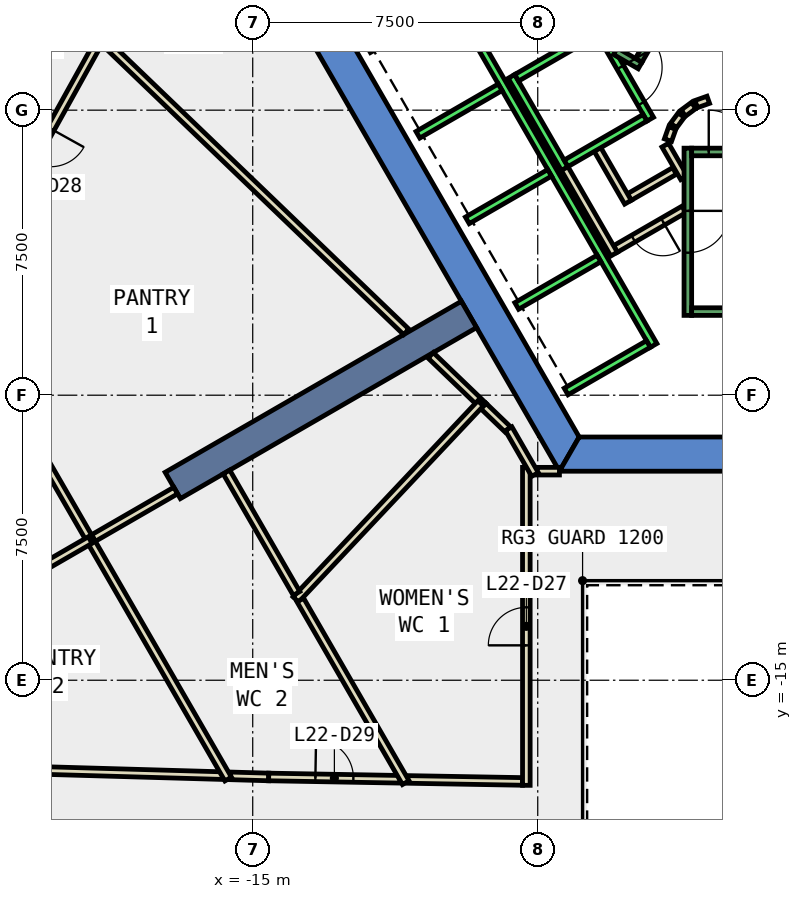
"""IFC4 building model, lengths in metres.
Left out: names, types, materials, properties, quantities, classifications, styles, units other than length and angle.
Written with IfcOpenShell. Run it as: python <this file> out.ifc"""

import sys

from ifc_helpers import new_model, si_unit, direction, frame, frame_2d, origin, place, context, subcontext, project, spatial, polyline, rectangle, outline, extrude, element, fill, save


model = new_model("IFC4")
c1 = context("Model", 3, precision=1e-05, world=origin(), true_north=direction((0.0, 1.0)))
c2 = subcontext(c1, "Body", "Model", "MODEL_VIEW")
j1 = project(units=[si_unit("LENGTHUNIT", "METRE"), si_unit("PLANEANGLEUNIT", "RADIAN")], contexts=[c1])
p1 = place(None, origin())
s1 = spatial("IfcSite", under=j1, at=p1, CompositionType="ELEMENT")
p2 = place(p1, origin())
s2 = spatial("IfcBuilding", under=s1, at=p2, CompositionType="ELEMENT")
p3 = place(p2, frame((0.0, 0.0, 103.4)))
s3 = spatial("IfcBuildingStorey", under=s2, at=p3, CompositionType="ELEMENT", Elevation=103.4)
p4 = place(p3, frame((0.0, 0.0, -0.4)))
e1 = element("IfcWall", 1, at=p4, inside=s3, PredefinedType="SHEAR", context=c2, shape_type="SweptSolid", body=[
    extrude(outline(polyline([(-13.856, 2.5), (-6.928, -9.5), (-6.409, -8.6), (-12.817, 2.5), (-13.856, 2.5)])), origin(), (0.0, 0.0, 1.0), 4.2),
])
p5 = place(p3, frame((0.0, 0.0, -0.4)))
e2 = element("IfcWall", 2, at=p5, inside=s3, PredefinedType="SHEAR", context=c2, shape_type="SweptSolid", body=[
    extrude(outline(polyline([(3.75, -9.5), (3.75, -8.6), (-6.409, -8.6), (-6.928, -9.5), (3.75, -9.5)])), origin(), (0.0, 0.0, 1.0), 4.2),
])
p6 = place(p3, frame((-9.31, -5.375, -0.4), z_axis=(0.0, 0.0, 1.0), x_axis=(-0.866017533419, -0.500013631625, 0.0)))
e3 = element("IfcWall", 3, at=p6, inside=s3, PredefinedType="SHEAR", context=c2, shape_type="SweptSolid", body=[
    extrude(rectangle(XDim=9.0, YDim=0.8, at=frame_2d((4.5, 0.0))), origin(), (0.0, 0.0, 1.0), 4.2),
])
p7 = place(p3, frame((-10.923, -17.61, 0.0), z_axis=(0.0, 0.0, 1.0), x_axis=(0.999846489632, -0.017521334753, 0.0)))
e4 = element("IfcWall", 4, at=p7, inside=s3, PredefinedType="PARTITIONING", context=c2, shape_type="SweptSolid", body=[
    extrude(rectangle(XDim=3.024, YDim=0.2, at=frame_2d((1.512, 0.0))), origin(), (0.0, 0.0, 1.0), 3.8),
])
p8 = place(p3, frame((-19.047, 1.799, 0.0), z_axis=(0.0, 0.0, 1.0), x_axis=(-0.485240396382, -0.87438078531, 0.0)))
e5 = element("IfcWall", 5, at=p8, inside=s3, PredefinedType="PARTITIONING", context=c2, shape_type="SweptSolid", body=[
    extrude(rectangle(XDim=6.232, YDim=0.2, at=frame_2d((3.116, 0.0))), origin(), (0.0, 0.0, 1.0), 3.8),
])
p9 = place(p8, frame((2.616, 0.0, 0.0)))
e6 = element("IfcOpeningElement", 6, at=p9, cuts=e5, PredefinedType="OPENING", context=c2, shape_type="SweptSolid", body=[
    extrude(rectangle(XDim=1.0, YDim=2.1, at=frame_2d((0.5, 1.05))), frame((0.0, 0.11, 0.0), z_axis=(0.0, -1.0, 0.0), x_axis=(1.0, 0.0, 0.0)), (0.0, 0.0, 1.0), 0.22),
])
p10 = place(p3, frame((-15.596, -17.516, 0.0), z_axis=(0.0, 0.0, 1.0), x_axis=(0.99959813819, -0.028347171427, 0.0)))
e7 = element("IfcWall", 7, at=p10, inside=s3, PredefinedType="PARTITIONING", context=c2, shape_type="SweptSolid", body=[
    extrude(rectangle(XDim=1.016, YDim=0.2, at=frame_2d((0.508, 0.0))), origin(), (0.0, 0.0, 1.0), 3.8),
])
p11 = place(p3, frame((-14.58, -17.545, 0.0), z_axis=(0.0, 0.0, 1.0), x_axis=(0.999844180431, -0.01765261618, 0.0)))
e8 = element("IfcWall", 8, at=p11, inside=s3, PredefinedType="PARTITIONING", context=c2, shape_type="SweptSolid", body=[
    extrude(rectangle(XDim=3.458, YDim=0.2, at=frame_2d((1.729, 0.0))), origin(), (0.0, 0.0, 1.0), 3.8),
])
p12 = place(p11, frame((1.229, 0.0, 0.0)))
e9 = element("IfcOpeningElement", 9, at=p12, cuts=e8, PredefinedType="OPENING", context=c2, shape_type="SweptSolid", body=[
    extrude(rectangle(XDim=1.0, YDim=2.1, at=frame_2d((0.5, 1.05))), frame((0.0, 0.11, 0.0), z_axis=(0.0, -1.0, 0.0), x_axis=(1.0, 0.0, 0.0)), (0.0, 0.0, 1.0), 0.22),
])
p13 = place(p3, frame((-21.471, -17.347, 0.0), z_axis=(0.0, 0.0, 1.0), x_axis=(0.999587337564, -0.028725504044, 0.0)))
e10 = element("IfcWall", 10, at=p13, inside=s3, PredefinedType="PARTITIONING", context=c2, shape_type="SweptSolid", body=[
    extrude(rectangle(XDim=5.677, YDim=0.2, at=frame_2d((2.839, 0.0))), origin(), (0.0, 0.0, 1.0), 3.8),
])
p14 = place(p3, frame((-3.9, -1.599, 0.0), z_axis=(0.0, 0.0, 1.0), x_axis=(-0.865969445389, -0.500096910261, 0.0)))
e11 = element("IfcWall", 11, at=p14, inside=s3, PredefinedType="PARTITIONING", context=c2, shape_type="SweptSolid", body=[
    extrude(rectangle(XDim=1.373, YDim=0.2, at=frame_2d((0.687, 0.0))), origin(), (0.0, 0.0, 1.0), 3.8),
])
p15 = place(p3, frame((-5.126, -2.422, 0.0), z_axis=(0.0, 0.0, 1.0), x_axis=(-0.500062241894, 0.865989465428, 0.0)))
e12 = element("IfcWall", 12, at=p15, inside=s3, PredefinedType="PARTITIONING", context=c2, shape_type="SweptSolid", body=[
    extrude(rectangle(XDim=1.7, YDim=0.2, at=frame_2d((0.85, 0.0))), origin(), (0.0, 0.0, 1.0), 3.8),
])
p16 = place(p3, frame((-3.65, -2.61, 0.0), z_axis=(0.0, 0.0, 1.0), x_axis=(-0.866072462134, -0.499918483688, 0.0)))
e13 = element("IfcWall", 13, at=p16, inside=s3, PredefinedType="PARTITIONING", context=c2, shape_type="SweptSolid", body=[
    extrude(rectangle(XDim=2.084, YDim=0.2, at=frame_2d((1.042, 0.0))), origin(), (0.0, 0.0, 1.0), 3.8),
])
p17 = place(p16, frame((0.642, 0.0, 0.0)))
e14 = element("IfcOpeningElement", 14, at=p17, cuts=e13, PredefinedType="OPENING", context=c2, shape_type="SweptSolid", body=[
    extrude(rectangle(XDim=0.9, YDim=2.1, at=frame_2d((0.45, 1.05))), frame((0.0, 0.11, 0.0), z_axis=(0.0, -1.0, 0.0), x_axis=(1.0, 0.0, 0.0)), (0.0, 0.0, 1.0), 0.22),
])
p18 = place(p3, frame((-5.492, -3.788, 0.0), z_axis=(0.0, 0.0, 1.0), x_axis=(-0.500008949224, 0.866020236886, 0.0)))
e15 = element("IfcWall", 15, at=p18, inside=s3, PredefinedType="PARTITIONING", context=c2, shape_type="SweptSolid", body=[
    extrude(rectangle(XDim=2.68, YDim=0.2, at=frame_2d((1.34, 0.0))), origin(), (0.0, 0.0, 1.0), 3.8),
])
p19 = place(p3, frame((-4.145, -0.92, 0.0), z_axis=(0.0, 0.0, 1.0), x_axis=(0.499743786207, -0.866173278362, 0.0)))
e16 = element("IfcWall", 16, at=p19, inside=s3, PredefinedType="PARTITIONING", context=c2, shape_type="SweptSolid", body=[
    extrude(rectangle(XDim=0.991, YDim=0.2, at=frame_2d((0.495, 0.0))), origin(), (0.0, 0.0, 1.0), 3.8),
])
p20 = place(p3, frame((-2.771, 4.7, 0.0), z_axis=(0.0, 0.0, 1.0), x_axis=(0.499969479948, -0.866043023828, 0.0)))
e17 = element("IfcWall", 17, at=p20, inside=s3, PredefinedType="PARTITIONING", context=c2, shape_type="SweptSolid", body=[
    extrude(rectangle(XDim=4.99, YDim=0.2, at=frame_2d((2.495, 0.0))), origin(), (0.0, 0.0, 1.0), 3.8),
])
p21 = place(p20, frame((1.945, 0.0, 0.0)))
e18 = element("IfcOpeningElement", 18, at=p21, cuts=e17, PredefinedType="OPENING", context=c2, shape_type="SweptSolid", body=[
    extrude(rectangle(XDim=1.0, YDim=2.1, at=frame_2d((0.5, 1.05))), frame((0.0, 0.11, 0.0), z_axis=(0.0, -1.0, 0.0), x_axis=(1.0, 0.0, 0.0)), (0.0, 0.0, 1.0), 0.22),
])
p22 = place(p3, frame((-3.012, 0.273, 0.0), z_axis=(0.0, 0.0, 1.0), x_axis=(-0.942280615813, -0.334824194261, 0.0)))
e19 = element("IfcWall", 19, at=p22, inside=s3, PredefinedType="PARTITIONING", context=c2, shape_type="SweptSolid", body=[
    extrude(rectangle(XDim=0.338, YDim=0.2, at=frame_2d((0.169, 0.0))), origin(), (0.0, 0.0, 1.0), 3.8),
])
p23 = place(p3, frame((-3.397, 0.124, 0.0), z_axis=(0.0, 0.0, 1.0), x_axis=(-0.804311165252, -0.594208338422, 0.0)))
e20 = element("IfcWall", 20, at=p23, inside=s3, PredefinedType="PARTITIONING", context=c2, shape_type="SweptSolid", body=[
    extrude(rectangle(XDim=0.338, YDim=0.2, at=frame_2d((0.169, 0.0))), origin(), (0.0, 0.0, 1.0), 3.8),
])
p24 = place(p3, frame((-3.723, -0.131, 0.0), z_axis=(0.0, 0.0, 1.0), x_axis=(-0.594675113454, -0.803966112121, 0.0)))
e21 = element("IfcWall", 21, at=p24, inside=s3, PredefinedType="PARTITIONING", context=c2, shape_type="SweptSolid", body=[
    extrude(rectangle(XDim=0.338, YDim=0.2, at=frame_2d((0.169, 0.0))), origin(), (0.0, 0.0, 1.0), 3.8),
])
p25 = place(p3, frame((-3.96, -0.47, 0.0), z_axis=(0.0, 0.0, 1.0), x_axis=(-0.334824194261, -0.942280615813, 0.0)))
e22 = element("IfcWall", 22, at=p25, inside=s3, PredefinedType="PARTITIONING", context=c2, shape_type="SweptSolid", body=[
    extrude(rectangle(XDim=0.338, YDim=0.2, at=frame_2d((0.169, 0.0))), origin(), (0.0, 0.0, 1.0), 3.8),
])
p26 = place(p3, frame((-7.522, -9.499, 0.0), z_axis=(0.0, 0.0, 1.0), x_axis=(1.0, 0.0, 0.0)))
e23 = element("IfcWall", 23, at=p26, inside=s3, PredefinedType="PARTITIONING", context=c2, shape_type="SweptSolid", body=[
    extrude(rectangle(XDim=0.593, YDim=0.2, at=frame_2d((0.296, 0.0))), origin(), (0.0, 0.0, 1.0), 3.8),
])
p27 = place(p3, frame((-7.8, -17.765, 0.0), z_axis=(0.0, 0.0, 1.0), x_axis=(0.0, 1.0, 0.0)))
e24 = element("IfcWall", 24, at=p27, inside=s3, PredefinedType="PARTITIONING", context=c2, shape_type="SweptSolid", body=[
    extrude(rectangle(XDim=8.366, YDim=0.2, at=frame_2d((4.183, 0.0))), origin(), (0.0, 0.0, 1.0), 3.8),
])
p28 = place(p27, frame((3.683, 0.0, 0.0)))
e25 = element("IfcOpeningElement", 25, at=p28, cuts=e24, PredefinedType="OPENING", context=c2, shape_type="SweptSolid", body=[
    extrude(rectangle(XDim=1.0, YDim=2.1, at=frame_2d((0.5, 1.05))), frame((0.0, 0.11, 0.0), z_axis=(0.0, -1.0, 0.0), x_axis=(1.0, 0.0, 0.0)), (0.0, 0.0, 1.0), 0.22),
])
p29 = place(p3, frame((-8.93, -7.783, 0.0), z_axis=(0.0, 0.0, 1.0), x_axis=(0.720954255291, -0.692982656189, 0.0)))
e26 = element("IfcWall", 26, at=p29, inside=s3, PredefinedType="PARTITIONING", context=c2, shape_type="SweptSolid", body=[
    extrude(rectangle(XDim=0.89, YDim=0.2, at=frame_2d((0.445, 0.0))), origin(), (0.0, 0.0, 1.0), 3.8),
])
p30 = place(p3, frame((-7.572, -9.586, 0.0), z_axis=(0.0, 0.0, 1.0), x_axis=(-0.499484152563, 0.866323023669, 0.0)))
e27 = element("IfcWall", 27, at=p30, inside=s3, PredefinedType="PARTITIONING", context=c2, shape_type="SweptSolid", body=[
    extrude(rectangle(XDim=1.39, YDim=0.2, at=frame_2d((0.695, 0.0))), origin(), (0.0, 0.0, 1.0), 3.8),
])
p31 = place(p3, frame((-8.93, -7.783, 0.0), z_axis=(0.0, 0.0, 1.0), x_axis=(-0.72124523191, 0.692679807305, 0.0)))
e28 = element("IfcWall", 28, at=p31, inside=s3, PredefinedType="PARTITIONING", context=c2, shape_type="SweptSolid", body=[
    extrude(rectangle(XDim=1.923, YDim=0.2, at=frame_2d((0.961, 0.0))), origin(), (0.0, 0.0, 1.0), 3.8),
])
p32 = place(p3, frame((-13.865, -12.876, 0.0), z_axis=(0.0, 0.0, 1.0), x_axis=(0.685651384846, 0.727930064263, 0.0)))
e29 = element("IfcWall", 29, at=p32, inside=s3, PredefinedType="PARTITIONING", context=c2, shape_type="SweptSolid", body=[
    extrude(rectangle(XDim=7.091, YDim=0.2, at=frame_2d((3.545, 0.0))), origin(), (0.0, 0.0, 1.0), 3.8),
])
p33 = place(p3, frame((-10.973, -17.695, 0.0), z_axis=(0.0, 0.0, 1.0), x_axis=(-0.499986535608, 0.866033177315, 0.0)))
e30 = element("IfcWall", 30, at=p33, inside=s3, PredefinedType="PARTITIONING", context=c2, shape_type="SweptSolid", body=[
    extrude(rectangle(XDim=5.549, YDim=0.2, at=frame_2d((2.774, 0.0))), origin(), (0.0, 0.0, 1.0), 3.8),
])
p34 = place(p3, frame((-13.847, -12.716, 0.0), z_axis=(0.0, 0.0, 1.0), x_axis=(-0.499861859587, 0.866105144501, 0.0)))
e31 = element("IfcWall", 31, at=p34, inside=s3, PredefinedType="PARTITIONING", context=c2, shape_type="SweptSolid", body=[
    extrude(rectangle(XDim=3.689, YDim=0.2, at=frame_2d((1.844, 0.0))), origin(), (0.0, 0.0, 1.0), 3.8),
])
p35 = place(p3, frame((-17.027, -10.009, 0.0), z_axis=(0.0, 0.0, 1.0), x_axis=(-0.865950948929, -0.500128937424, 0.0)))
e32 = element("IfcWall", 32, at=p35, inside=s3, PredefinedType="PARTITIONING", context=c2, shape_type="SweptSolid", body=[
    extrude(rectangle(XDim=2.599, YDim=0.2, at=frame_2d((1.3, 0.0))), origin(), (0.0, 0.0, 1.0), 3.8),
])
p36 = place(p3, frame((-19.278, -11.309, 0.0), z_axis=(0.0, 0.0, 1.0), x_axis=(-0.500044545065, 0.865999684151, 0.0)))
e33 = element("IfcWall", 33, at=p36, inside=s3, PredefinedType="PARTITIONING", context=c2, shape_type="SweptSolid", body=[
    extrude(rectangle(XDim=7.261, YDim=0.2, at=frame_2d((3.63, 0.0))), origin(), (0.0, 0.0, 1.0), 3.8),
])
p37 = place(p3, frame((-15.646, -17.6, 0.0), z_axis=(0.0, 0.0, 1.0), x_axis=(-0.499953299825, 0.866052364464, 0.0)))
e34 = element("IfcWall", 34, at=p37, inside=s3, PredefinedType="PARTITIONING", context=c2, shape_type="SweptSolid", body=[
    extrude(rectangle(XDim=7.263, YDim=0.2, at=frame_2d((3.631, 0.0))), origin(), (0.0, 0.0, 1.0), 3.8),
])
p38 = place(p3, frame((-19.277, -11.311, 0.0), z_axis=(0.0, 0.0, 1.0), x_axis=(-0.866078939042, -0.499907262747, 0.0)))
e35 = element("IfcWall", 35, at=p38, inside=s3, PredefinedType="PARTITIONING", context=c2, shape_type="SweptSolid", body=[
    extrude(rectangle(XDim=10.864, YDim=0.2, at=frame_2d((5.432, 0.0))), origin(), (0.0, 0.0, 1.0), 3.8),
])
p39 = place(p3, frame((-10.96, -5.834, 0.0), z_axis=(0.0, 0.0, 1.0), x_axis=(-0.721236335428, 0.692689070549, 0.0)))
e36 = element("IfcWall", 36, at=p39, inside=s3, PredefinedType="PARTITIONING", context=c2, shape_type="SweptSolid", body=[
    extrude(rectangle(XDim=11.246, YDim=0.2, at=frame_2d((5.623, 0.0))), origin(), (0.0, 0.0, 1.0), 3.8),
])
p40 = place(p3, frame((-5.94, 2.188, 0.0), z_axis=(0.0, 0.0, 1.0), x_axis=(0.49994636267, -0.866056369097, 0.0)))
e37 = element("IfcWall", 37, at=p40, inside=s3, PredefinedType="STANDARD", context=c2, shape_type="SweptSolid", body=[
    extrude(rectangle(XDim=2.8, YDim=0.2, at=frame_2d((1.4, 0.0))), origin(), (0.0, 0.0, 1.0), 3.8),
])
p41 = place(p40, frame((1.225, 0.0, 0.0)))
e38 = element("IfcOpeningElement", 38, at=p41, cuts=e37, PredefinedType="OPENING", context=c2, shape_type="SweptSolid", body=[
    extrude(rectangle(XDim=1.1, YDim=2.1, at=frame_2d((0.55, 1.05))), frame((0.0, 0.11, 0.0), z_axis=(0.0, -1.0, 0.0), x_axis=(1.0, 0.0, 0.0)), (0.0, 0.0, 1.0), 0.22),
])
p42 = place(p3, frame((-8.192, 0.888, 0.0), z_axis=(0.0, 0.0, 1.0), x_axis=(0.49994636267, -0.866056369097, 0.0)))
e39 = element("IfcWall", 39, at=p42, inside=s3, PredefinedType="STANDARD", context=c2, shape_type="SweptSolid", body=[
    extrude(rectangle(XDim=2.8, YDim=0.2, at=frame_2d((1.4, 0.0))), origin(), (0.0, 0.0, 1.0), 3.8),
])
for number, where, z_axis, x_axis in (
    (40, (-5.977, 2.052, 0.0), (0.0, 0.0, 1.0), (-0.866, -0.5, 0.0)),
    (41, (-4.677, -0.2, 0.0), (0.0, 0.0, 1.0), (-0.866, -0.5, 0.0)),
):
    element("IfcWall", number, at=place(p3, frame(where, z_axis=z_axis, x_axis=x_axis)), inside=s3, PredefinedType="STANDARD", context=c2, shape_type="SweptSolid", body=[
        extrude(rectangle(XDim=2.399, YDim=0.2, at=frame_2d((1.2, 0.0))), origin(), (0.0, 0.0, 1.0), 3.8),
    ])
p43 = place(p3, frame((-9.751, 2.99, 0.0), z_axis=(0.0, 0.0, 1.0), x_axis=(0.50000090737, -0.866024879913, 0.0)))
e42 = element("IfcWall", 42, at=p43, inside=s3, PredefinedType="STANDARD", context=c2, shape_type="SweptSolid", body=[
    extrude(rectangle(XDim=10.6, YDim=0.2, at=frame_2d((5.3, 0.0))), origin(), (0.0, 0.0, 1.0), 3.8),
])
for number, where, z_axis, x_axis in (
    (43, (-8.488, 0.602, 0.0), (0.0, 0.0, 1.0), (-0.866, -0.5, 0.0)),
    (44, (-7.188, -1.65, 0.0), (0.0, 0.0, 1.0), (-0.866, -0.5, 0.0)),
    (45, (-5.888, -3.902, 0.0), (0.0, 0.0, 1.0), (-0.866, -0.5, 0.0)),
    (46, (-4.588, -6.153, 0.0), (0.0, 0.0, 1.0), (-0.866, -0.5, 0.0)),
):
    element("IfcWall", number, at=place(p3, frame(where, z_axis=z_axis, x_axis=x_axis)), inside=s3, PredefinedType="STANDARD", context=c2, shape_type="SweptSolid", body=[
        extrude(rectangle(XDim=2.5, YDim=0.2, at=frame_2d((1.25, 0.0))), origin(), (0.0, 0.0, 1.0), 3.8),
    ])
p44 = place(p3, frame((-3.55, -1.0, 0.0), z_axis=(0.0, 0.0, 1.0), x_axis=(0.0, -1.0, 0.0)))
e47 = element("IfcWall", 47, at=p44, inside=s3, PredefinedType="STANDARD", context=c2, shape_type="SweptSolid", body=[
    extrude(rectangle(XDim=4.4, YDim=0.2, at=frame_2d((2.2, 0.0))), origin(), (0.0, 0.0, 1.0), 3.8),
])
p45 = place(p44, frame((1.65, 0.0, 0.0)))
e48 = element("IfcOpeningElement", 48, at=p45, cuts=e47, PredefinedType="OPENING", context=c2, shape_type="SweptSolid", body=[
    extrude(rectangle(XDim=1.1, YDim=2.2, at=frame_2d((0.55, 1.1))), frame((0.0, 0.11, 0.0), z_axis=(0.0, -1.0, 0.0), x_axis=(1.0, 0.0, 0.0)), (0.0, 0.0, 1.0), 0.22),
])
p46 = place(p3, frame((-3.45, -1.1, 0.0), z_axis=(0.0, 0.0, 1.0), x_axis=(1.0, 0.0, 0.0)))
e49 = element("IfcWall", 49, at=p46, inside=s3, PredefinedType="STANDARD", context=c2, shape_type="SweptSolid", body=[
    extrude(rectangle(XDim=6.9, YDim=0.2, at=frame_2d((3.45, 0.0))), origin(), (0.0, 0.0, 1.0), 3.8),
])
p47 = place(p46, frame((0.45, 0.0, 0.0)))
e50 = element("IfcOpeningElement", 50, at=p47, cuts=e49, PredefinedType="OPENING", context=c2, shape_type="SweptSolid", body=[
    extrude(rectangle(XDim=1.1, YDim=2.2, at=frame_2d((0.55, 1.1))), frame((0.0, 0.11, 0.0), z_axis=(0.0, -1.0, 0.0), x_axis=(1.0, 0.0, 0.0)), (0.0, 0.0, 1.0), 0.22),
])
p48 = place(p3, frame((-3.45, -5.3, 0.0), z_axis=(0.0, 0.0, 1.0), x_axis=(1.0, 0.0, 0.0)))
e51 = element("IfcWall", 51, at=p48, inside=s3, PredefinedType="STANDARD", context=c2, shape_type="SweptSolid", body=[
    extrude(rectangle(XDim=6.9, YDim=0.2, at=frame_2d((3.45, 0.0))), origin(), (0.0, 0.0, 1.0), 3.8),
])
p49 = place(p3, frame((-4.806, 1.176, 0.0), z_axis=(0.0, 0.0, 1.0), x_axis=(-0.866558586415, 0.499075361355, 0.0)))
e52 = element("IfcWall", 52, at=p49, inside=s3, PredefinedType="STANDARD", context=c2, shape_type="SweptSolid", body=[
    extrude(rectangle(XDim=0.751, YDim=0.2, at=frame_2d((0.376, 0.0))), origin(), (0.0, 0.0, 1.0), 3.8),
])
p50 = place(p3, frame((-1.393, 7.288, 0.0), z_axis=(0.0, 0.0, 1.0), x_axis=(-0.499963383562, -0.866046543262, 0.0)))
e53 = element("IfcWall", 53, at=p50, inside=s3, PredefinedType="STANDARD", context=c2, shape_type="SweptSolid", body=[
    extrude(rectangle(XDim=6.9, YDim=0.2, at=frame_2d((3.45, 0.0))), origin(), (0.0, 0.0, 1.0), 3.8),
])
p51 = place(p50, frame((0.45, 0.0, 0.0)))
e54 = element("IfcOpeningElement", 54, at=p51, cuts=e53, PredefinedType="OPENING", context=c2, shape_type="SweptSolid", body=[
    extrude(rectangle(XDim=1.1, YDim=2.2, at=frame_2d((0.55, 1.1))), frame((0.0, 0.11, 0.0), z_axis=(0.0, -1.0, 0.0), x_axis=(1.0, 0.0, 0.0)), (0.0, 0.0, 1.0), 0.22),
])
p52 = place(p28, origin())
e55 = element("IfcDoor", 55, at=p52, inside=s3, OperationType="SINGLE_SWING_RIGHT", PredefinedType="DOOR", context=c2, shape_type="SweptSolid", body=[
    extrude(rectangle(XDim=1.0, YDim=2.1, at=frame_2d((0.5, 1.05))), frame((0.0, 0.025, 0.0), z_axis=(0.0, -1.0, 0.0), x_axis=(1.0, 0.0, 0.0)), (0.0, 0.0, 1.0), 0.05),
])
fill(e25, e55)
p53 = place(p12, origin())
e56 = element("IfcDoor", 56, at=p53, inside=s3, OperationType="SINGLE_SWING_LEFT", PredefinedType="DOOR", context=c2, shape_type="SweptSolid", body=[
    extrude(rectangle(XDim=1.0, YDim=2.1, at=frame_2d((0.5, 1.05))), frame((0.0, 0.025, 0.0), z_axis=(0.0, -1.0, 0.0), x_axis=(1.0, 0.0, 0.0)), (0.0, 0.0, 1.0), 0.05),
])
fill(e9, e56)
p54 = place(p17, origin())
e57 = element("IfcDoor", 57, at=p54, inside=s3, OperationType="SINGLE_SWING_LEFT", PredefinedType="DOOR", context=c2, shape_type="SweptSolid", body=[
    extrude(rectangle(XDim=0.9, YDim=2.1, at=frame_2d((0.45, 1.05))), frame((0.0, 0.025, 0.0), z_axis=(0.0, -1.0, 0.0), x_axis=(1.0, 0.0, 0.0)), (0.0, 0.0, 1.0), 0.05),
])
fill(e14, e57)
p55 = place(p41, origin())
e58 = element("IfcDoor", 58, at=p55, inside=s3, OperationType="SLIDING_TO_LEFT", PredefinedType="DOOR", context=c2, shape_type="SweptSolid", body=[
    extrude(rectangle(XDim=1.1, YDim=2.1, at=frame_2d((0.55, 1.05))), frame((0.0, 0.025, 0.0), z_axis=(0.0, -1.0, 0.0), x_axis=(1.0, 0.0, 0.0)), (0.0, 0.0, 1.0), 0.05),
])
fill(e38, e58)
p56 = place(p47, origin())
e59 = element("IfcDoor", 59, at=p56, inside=s3, OperationType="SINGLE_SWING_LEFT", PredefinedType="DOOR", context=c2, shape_type="SweptSolid", body=[
    extrude(rectangle(XDim=1.1, YDim=2.2, at=frame_2d((0.55, 1.1))), frame((0.0, 0.025, 0.0), z_axis=(0.0, -1.0, 0.0), x_axis=(1.0, 0.0, 0.0)), (0.0, 0.0, 1.0), 0.05),
])
fill(e50, e59)
p57 = place(p45, origin())
e60 = element("IfcDoor", 60, at=p57, inside=s3, OperationType="SINGLE_SWING_LEFT", PredefinedType="DOOR", context=c2, shape_type="SweptSolid", body=[
    extrude(rectangle(XDim=1.1, YDim=2.2, at=frame_2d((0.55, 1.1))), frame((0.0, 0.025, 0.0), z_axis=(0.0, -1.0, 0.0), x_axis=(1.0, 0.0, 0.0)), (0.0, 0.0, 1.0), 0.05),
])
fill(e48, e60)
save(model, sys.argv[1])
